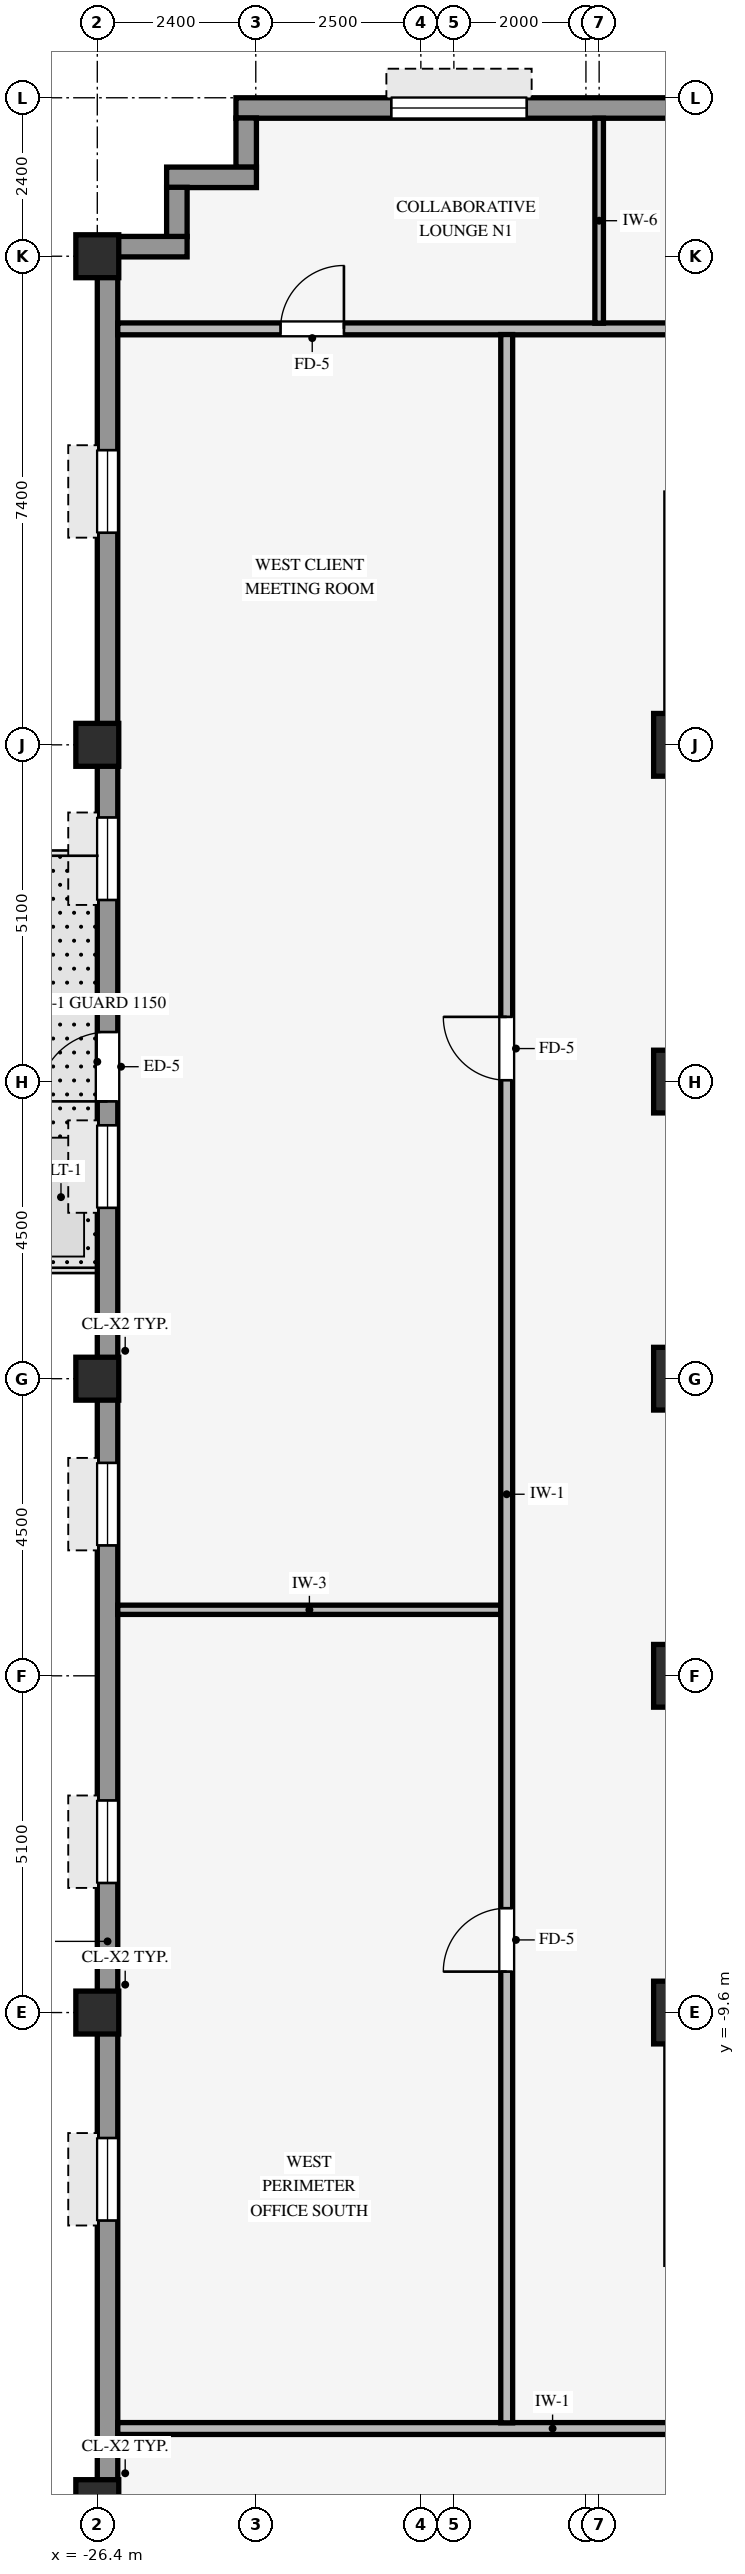
"""IFC4 building model, lengths in metres.
Left out: names, types, materials, properties, quantities, classifications, styles, units other than length and angle.
Written with IfcOpenShell. Run it as: python <this file> out.ifc"""

import sys

from ifc_helpers import new_model, si_unit, direction, frame, frame_2d, origin, origin_2d, place, context, subcontext, project, spatial, rectangle, hollow_rectangle, extrude, source, transform, mapped, element, fill, save


model = new_model("IFC4")
c1 = context("Model", 3, precision=1e-05, world=origin(), true_north=direction((0.0, 1.0)))
c2 = subcontext(c1, "Body", "Model", "MODEL_VIEW")
j1 = project(units=[si_unit("LENGTHUNIT", "METRE"), si_unit("PLANEANGLEUNIT", "RADIAN")], contexts=[c1])
p1 = place(None, origin())
s1 = spatial("IfcSite", under=j1, at=p1, CompositionType="ELEMENT")
p2 = place(p1, origin())
s2 = spatial("IfcBuilding", under=s1, at=p2, CompositionType="ELEMENT")
p3 = place(p2, frame((0.0, 0.0, 171.3)))
s3 = spatial("IfcBuildingStorey", under=s2, at=p3, CompositionType="ELEMENT", Elevation=171.3)
for number, where, z_axis, x_axis in (
    (1, (-17.5, -9.6, 0.0), (0.0, 0.0, 1.0), (1.0, 0.0, 0.0)),
    (2, (-17.5, -4.5, 0.0), (0.0, 0.0, 1.0), (1.0, 0.0, 0.0)),
    (3, (-17.5, 4.5, 0.0), (0.0, 0.0, 1.0), (1.0, 0.0, 0.0)),
    (4, (-17.5, 9.6, 0.0), (0.0, 0.0, 1.0), (1.0, 0.0, 0.0)),
    (5, (-17.5, 0.0, 0.0), (0.0, 0.0, 1.0), (1.0, 0.0, 0.0)),
):
    element("IfcColumn", number, at=place(p3, frame(where, z_axis=z_axis, x_axis=x_axis)), inside=s3, PredefinedType="COLUMN", context=c2, shape_type="SweptSolid", body=[
        extrude(rectangle(XDim=0.95, YDim=0.95, at=origin_2d()), origin(), (0.0, 0.0, 1.0), 3.37),
    ])
for number, where, z_axis, x_axis in (
    (6, (-26.4, -17.0, 0.0), (0.0, 0.0, 1.0), (1.0, 0.0, 0.0)),
    (7, (-26.4, -9.6, 0.0), (0.0, 0.0, 1.0), (1.0, 0.0, 0.0)),
    (8, (-26.4, 0.0, 0.0), (0.0, 0.0, 1.0), (1.0, 0.0, 0.0)),
    (9, (-26.4, 9.6, 0.0), (0.0, 0.0, 1.0), (1.0, 0.0, 0.0)),
    (10, (-26.4, 17.0, 0.0), (0.0, 0.0, 1.0), (1.0, 0.0, 0.0)),
):
    element("IfcColumn", number, at=place(p3, frame(where, z_axis=z_axis, x_axis=x_axis)), inside=s3, PredefinedType="COLUMN", context=c2, shape_type="SweptSolid", body=[
        extrude(hollow_rectangle(XDim=0.65, YDim=0.65, WallThickness=0.04, InnerFilletRadius=0.04, OuterFilletRadius=0.08, at=origin_2d()), origin(), (0.0, 0.0, 1.0), 3.37),
    ])
p4 = place(p3, frame((-24.3, 19.245, 0.0), z_axis=(0.0, 0.0, 1.0), x_axis=(1.0, 0.0, 0.0)))
e11 = element("IfcWall", 11, at=p4, inside=s3, PredefinedType="STANDARD", context=c2, shape_type="SweptSolid", body=[
    extrude(rectangle(XDim=44.8, YDim=0.31, at=frame_2d((22.4, 0.0))), origin(), (0.0, 0.0, 1.0), 2.705),
])
p5 = place(p4, frame((2.353, 0.0, 0.8)))
e12 = element("IfcOpeningElement", 12, at=p5, cuts=e11, PredefinedType="OPENING", context=c2, shape_type="SweptSolid", body=[
    extrude(rectangle(XDim=2.05, YDim=1.52, at=frame_2d((1.025, 0.76))), frame((0.0, 0.165, 0.0), z_axis=(0.0, -1.0, 0.0), x_axis=(1.0, 0.0, 0.0)), (0.0, 0.0, 1.0), 0.33),
])
p6 = place(p4, frame((7.108, 0.0, 0.8)))
e13 = element("IfcOpeningElement", 13, at=p6, cuts=e11, PredefinedType="OPENING", context=c2, shape_type="SweptSolid", body=[
    extrude(rectangle(XDim=2.05, YDim=1.52, at=frame_2d((1.025, 0.76))), frame((0.0, 0.165, 0.0), z_axis=(0.0, -1.0, 0.0), x_axis=(1.0, 0.0, 0.0)), (0.0, 0.0, 1.0), 0.33),
])
p7 = place(p4, frame((11.414, 0.0, 0.8)))
e14 = element("IfcOpeningElement", 14, at=p7, cuts=e11, PredefinedType="OPENING", context=c2, shape_type="SweptSolid", body=[
    extrude(rectangle(XDim=2.05, YDim=1.52, at=frame_2d((1.025, 0.76))), frame((0.0, 0.165, 0.0), z_axis=(0.0, -1.0, 0.0), x_axis=(1.0, 0.0, 0.0)), (0.0, 0.0, 1.0), 0.33),
])
p8 = place(p4, frame((16.619, 0.0, 0.8)))
e15 = element("IfcOpeningElement", 15, at=p8, cuts=e11, PredefinedType="OPENING", context=c2, shape_type="SweptSolid", body=[
    extrude(rectangle(XDim=2.05, YDim=1.52, at=frame_2d((1.025, 0.76))), frame((0.0, 0.165, 0.0), z_axis=(0.0, -1.0, 0.0), x_axis=(1.0, 0.0, 0.0)), (0.0, 0.0, 1.0), 0.33),
])
p9 = place(p4, frame((20.925, 0.0, 0.8)))
e16 = element("IfcOpeningElement", 16, at=p9, cuts=e11, PredefinedType="OPENING", context=c2, shape_type="SweptSolid", body=[
    extrude(rectangle(XDim=2.05, YDim=1.52, at=frame_2d((1.025, 0.76))), frame((0.0, 0.165, 0.0), z_axis=(0.0, -1.0, 0.0), x_axis=(1.0, 0.0, 0.0)), (0.0, 0.0, 1.0), 0.33),
])
p10 = place(p4, frame((26.131, 0.0, 0.8)))
e17 = element("IfcOpeningElement", 17, at=p10, cuts=e11, PredefinedType="OPENING", context=c2, shape_type="SweptSolid", body=[
    extrude(rectangle(XDim=2.05, YDim=1.52, at=frame_2d((1.025, 0.76))), frame((0.0, 0.165, 0.0), z_axis=(0.0, -1.0, 0.0), x_axis=(1.0, 0.0, 0.0)), (0.0, 0.0, 1.0), 0.33),
])
p11 = place(p4, frame((29.986, 0.0, 0.8)))
e18 = element("IfcOpeningElement", 18, at=p11, cuts=e11, PredefinedType="OPENING", context=c2, shape_type="SweptSolid", body=[
    extrude(rectangle(XDim=2.05, YDim=1.52, at=frame_2d((1.025, 0.76))), frame((0.0, 0.165, 0.0), z_axis=(0.0, -1.0, 0.0), x_axis=(1.0, 0.0, 0.0)), (0.0, 0.0, 1.0), 0.33),
])
p12 = place(p4, frame((35.642, 0.0, 0.8)))
e19 = element("IfcOpeningElement", 19, at=p12, cuts=e11, PredefinedType="OPENING", context=c2, shape_type="SweptSolid", body=[
    extrude(rectangle(XDim=2.05, YDim=1.52, at=frame_2d((1.025, 0.76))), frame((0.0, 0.165, 0.0), z_axis=(0.0, -1.0, 0.0), x_axis=(1.0, 0.0, 0.0)), (0.0, 0.0, 1.0), 0.33),
])
p13 = place(p4, frame((40.397, 0.0, 0.8)))
e20 = element("IfcOpeningElement", 20, at=p13, cuts=e11, PredefinedType="OPENING", context=c2, shape_type="SweptSolid", body=[
    extrude(rectangle(XDim=2.05, YDim=1.52, at=frame_2d((1.025, 0.76))), frame((0.0, 0.165, 0.0), z_axis=(0.0, -1.0, 0.0), x_axis=(1.0, 0.0, 0.0)), (0.0, 0.0, 1.0), 0.33),
])
p14 = place(p3, frame((-24.145, 18.346, 0.0), z_axis=(0.0, 0.0, 1.0), x_axis=(0.0, 1.0, 0.0)))
e21 = element("IfcWall", 21, at=p14, inside=s3, PredefinedType="STANDARD", context=c2, shape_type="SweptSolid", body=[
    extrude(rectangle(XDim=0.748, YDim=0.31, at=frame_2d((0.374, 0.0))), origin(), (0.0, 0.0, 1.0), 2.816),
])
p15 = place(p3, frame((-25.35, 18.195, 0.0), z_axis=(0.0, 0.0, 1.0), x_axis=(1.0, 0.0, 0.0)))
e22 = element("IfcWall", 22, at=p15, inside=s3, PredefinedType="STANDARD", context=c2, shape_type="SweptSolid", body=[
    extrude(rectangle(XDim=1.36, YDim=0.31, at=frame_2d((0.68, 0.0))), origin(), (0.0, 0.0, 1.0), 2.816),
])
p16 = place(p3, frame((-25.195, 17.296, 0.0), z_axis=(0.0, 0.0, 1.0), x_axis=(0.0, 1.0, 0.0)))
e23 = element("IfcWall", 23, at=p16, inside=s3, PredefinedType="STANDARD", context=c2, shape_type="SweptSolid", body=[
    extrude(rectangle(XDim=0.748, YDim=0.31, at=frame_2d((0.374, 0.0))), origin(), (0.0, 0.0, 1.0), 2.816),
])
p17 = place(p3, frame((-26.4, 17.145, 0.0), z_axis=(0.0, 0.0, 1.0), x_axis=(1.0, 0.0, 0.0)))
e24 = element("IfcWall", 24, at=p17, inside=s3, PredefinedType="STANDARD", context=c2, shape_type="SweptSolid", body=[
    extrude(rectangle(XDim=1.36, YDim=0.31, at=frame_2d((0.68, 0.0))), origin(), (0.0, 0.0, 1.0), 2.816),
])
p18 = place(p3, frame((-26.245, -20.794, 0.0), z_axis=(0.0, 0.0, 1.0), x_axis=(0.0, 1.0, 0.0)))
e25 = element("IfcWall", 25, at=p18, inside=s3, PredefinedType="STANDARD", context=c2, shape_type="SweptSolid", body=[
    extrude(rectangle(XDim=37.788, YDim=0.31, at=frame_2d((18.894, 0.0))), origin(), (0.0, 0.0, 1.0), 2.705),
])
p19 = place(p18, frame((24.994, 0.0, 0.0)))
e26 = element("IfcOpeningElement", 26, at=p19, cuts=e25, PredefinedType="OPENING", context=c2, shape_type="SweptSolid", body=[
    extrude(rectangle(XDim=1.05, YDim=2.1, at=frame_2d((0.525, 1.05))), frame((0.0, 0.165, 0.0), z_axis=(0.0, -1.0, 0.0), x_axis=(1.0, 0.0, 0.0)), (0.0, 0.0, 1.0), 0.33),
])
p20 = place(p18, frame((1.581, 0.0, 0.8)))
e27 = element("IfcOpeningElement", 27, at=p20, cuts=e25, PredefinedType="OPENING", context=c2, shape_type="SweptSolid", body=[
    extrude(rectangle(XDim=1.25, YDim=1.52, at=frame_2d((0.625, 0.76))), frame((0.0, 0.165, 0.0), z_axis=(0.0, -1.0, 0.0), x_axis=(1.0, 0.0, 0.0)), (0.0, 0.0, 1.0), 0.33),
])
p21 = place(p18, frame((8.044, 0.0, 0.8)))
e28 = element("IfcOpeningElement", 28, at=p21, cuts=e25, PredefinedType="OPENING", context=c2, shape_type="SweptSolid", body=[
    extrude(rectangle(XDim=1.25, YDim=1.52, at=frame_2d((0.625, 0.76))), frame((0.0, 0.165, 0.0), z_axis=(0.0, -1.0, 0.0), x_axis=(1.0, 0.0, 0.0)), (0.0, 0.0, 1.0), 0.33),
])
p22 = place(p18, frame((13.156, 0.0, 0.8)))
e29 = element("IfcOpeningElement", 29, at=p22, cuts=e25, PredefinedType="OPENING", context=c2, shape_type="SweptSolid", body=[
    extrude(rectangle(XDim=1.25, YDim=1.52, at=frame_2d((0.625, 0.76))), frame((0.0, 0.165, 0.0), z_axis=(0.0, -1.0, 0.0), x_axis=(1.0, 0.0, 0.0)), (0.0, 0.0, 1.0), 0.33),
])
p23 = place(p18, frame((18.269, 0.0, 0.8)))
e30 = element("IfcOpeningElement", 30, at=p23, cuts=e25, PredefinedType="OPENING", context=c2, shape_type="SweptSolid", body=[
    extrude(rectangle(XDim=1.25, YDim=1.52, at=frame_2d((0.625, 0.76))), frame((0.0, 0.165, 0.0), z_axis=(0.0, -1.0, 0.0), x_axis=(1.0, 0.0, 0.0)), (0.0, 0.0, 1.0), 0.33),
])
p24 = place(p18, frame((23.382, 0.0, 0.8)))
e31 = element("IfcOpeningElement", 31, at=p24, cuts=e25, PredefinedType="OPENING", context=c2, shape_type="SweptSolid", body=[
    extrude(rectangle(XDim=1.25, YDim=1.52, at=frame_2d((0.625, 0.76))), frame((0.0, 0.165, 0.0), z_axis=(0.0, -1.0, 0.0), x_axis=(1.0, 0.0, 0.0)), (0.0, 0.0, 1.0), 0.33),
])
p25 = place(p18, frame((28.044, 0.0, 0.8)))
e32 = element("IfcOpeningElement", 32, at=p25, cuts=e25, PredefinedType="OPENING", context=c2, shape_type="SweptSolid", body=[
    extrude(rectangle(XDim=1.25, YDim=1.52, at=frame_2d((0.625, 0.76))), frame((0.0, 0.165, 0.0), z_axis=(0.0, -1.0, 0.0), x_axis=(1.0, 0.0, 0.0)), (0.0, 0.0, 1.0), 0.33),
])
p26 = place(p18, frame((33.607, 0.0, 0.8)))
e33 = element("IfcOpeningElement", 33, at=p26, cuts=e25, PredefinedType="OPENING", context=c2, shape_type="SweptSolid", body=[
    extrude(rectangle(XDim=1.25, YDim=1.52, at=frame_2d((0.625, 0.76))), frame((0.0, 0.165, 0.0), z_axis=(0.0, -1.0, 0.0), x_axis=(1.0, 0.0, 0.0)), (0.0, 0.0, 1.0), 0.33),
])
p27 = place(p3, frame((-26.09, -15.9, 0.0), z_axis=(0.0, 0.0, 1.0), x_axis=(1.0, 0.0, 0.0)))
e34 = element("IfcWall", 34, at=p27, inside=s3, PredefinedType="PARTITIONING", context=c2, shape_type="SweptSolid", body=[
    extrude(rectangle(XDim=48.38, YDim=0.18, at=frame_2d((24.19, 0.0))), origin(), (0.0, 0.0, 1.0), 3.36),
])
p28 = place(p27, frame((26.51, 0.0, 0.0)))
e35 = element("IfcOpeningElement", 35, at=p28, cuts=e34, PredefinedType="OPENING", context=c2, shape_type="SweptSolid", body=[
    extrude(rectangle(XDim=0.96, YDim=2.1, at=frame_2d((0.48, 1.05))), frame((0.0, 0.1, 0.0), z_axis=(0.0, -1.0, 0.0), x_axis=(1.0, 0.0, 0.0)), (0.0, 0.0, 1.0), 0.2),
])
p29 = place(p27, frame((40.51, 0.0, 0.0)))
e36 = element("IfcOpeningElement", 36, at=p29, cuts=e34, PredefinedType="OPENING", context=c2, shape_type="SweptSolid", body=[
    extrude(rectangle(XDim=0.96, YDim=2.1, at=frame_2d((0.48, 1.05))), frame((0.0, 0.1, 0.0), z_axis=(0.0, -1.0, 0.0), x_axis=(1.0, 0.0, 0.0)), (0.0, 0.0, 1.0), 0.2),
])
p30 = place(p27, frame((13.62, 0.0, 0.0)))
e37 = element("IfcOpeningElement", 37, at=p30, cuts=e34, PredefinedType="OPENING", context=c2, shape_type="SweptSolid", body=[
    extrude(rectangle(XDim=0.96, YDim=2.1, at=frame_2d((0.48, 1.05))), frame((0.0, 0.1, 0.0), z_axis=(0.0, -1.0, 0.0), x_axis=(1.0, 0.0, 0.0)), (0.0, 0.0, 1.0), 0.2),
])
p31 = place(p3, frame((-26.09, -3.5, 0.0), z_axis=(0.0, 0.0, 1.0), x_axis=(1.0, 0.0, 0.0)))
e38 = element("IfcWall", 38, at=p31, inside=s3, PredefinedType="PARTITIONING", context=c2, shape_type="SweptSolid", body=[
    extrude(rectangle(XDim=5.804, YDim=0.14, at=frame_2d((2.902, 0.0))), origin(), (0.0, 0.0, 1.0), 3.36),
])
p32 = place(p3, frame((-26.09, 15.9, 0.0), z_axis=(0.0, 0.0, 1.0), x_axis=(1.0, 0.0, 0.0)))
e39 = element("IfcWall", 39, at=p32, inside=s3, PredefinedType="PARTITIONING", context=c2, shape_type="SweptSolid", body=[
    extrude(rectangle(XDim=48.38, YDim=0.18, at=frame_2d((24.19, 0.0))), origin(), (0.0, 0.0, 1.0), 3.36),
])
p33 = place(p32, frame((40.51, 0.0, 0.0)))
e40 = element("IfcOpeningElement", 40, at=p33, cuts=e39, PredefinedType="OPENING", context=c2, shape_type="SweptSolid", body=[
    extrude(rectangle(XDim=0.96, YDim=2.1, at=frame_2d((0.48, 1.05))), frame((0.0, 0.1, 0.0), z_axis=(0.0, -1.0, 0.0), x_axis=(1.0, 0.0, 0.0)), (0.0, 0.0, 1.0), 0.2),
])
p34 = place(p32, frame((19.995, 0.0, 0.0)))
e41 = element("IfcOpeningElement", 41, at=p34, cuts=e39, PredefinedType="OPENING", context=c2, shape_type="SweptSolid", body=[
    extrude(rectangle(XDim=0.96, YDim=2.1, at=frame_2d((0.48, 1.05))), frame((0.0, 0.1, 0.0), z_axis=(0.0, -1.0, 0.0), x_axis=(1.0, 0.0, 0.0)), (0.0, 0.0, 1.0), 0.2),
])
p35 = place(p32, frame((28.45, 0.0, 0.0)))
e42 = element("IfcOpeningElement", 42, at=p35, cuts=e39, PredefinedType="OPENING", context=c2, shape_type="SweptSolid", body=[
    extrude(rectangle(XDim=0.96, YDim=2.1, at=frame_2d((0.48, 1.05))), frame((0.0, 0.1, 0.0), z_axis=(0.0, -1.0, 0.0), x_axis=(1.0, 0.0, 0.0)), (0.0, 0.0, 1.0), 0.2),
])
p36 = place(p32, frame((11.605, 0.0, 0.0)))
e43 = element("IfcOpeningElement", 43, at=p36, cuts=e39, PredefinedType="OPENING", context=c2, shape_type="SweptSolid", body=[
    extrude(rectangle(XDim=0.96, YDim=2.1, at=frame_2d((0.48, 1.05))), frame((0.0, 0.1, 0.0), z_axis=(0.0, -1.0, 0.0), x_axis=(1.0, 0.0, 0.0)), (0.0, 0.0, 1.0), 0.2),
])
p37 = place(p32, frame((2.465, 0.0, 0.0)))
e44 = element("IfcOpeningElement", 44, at=p37, cuts=e39, PredefinedType="OPENING", context=c2, shape_type="SweptSolid", body=[
    extrude(rectangle(XDim=0.96, YDim=2.1, at=frame_2d((0.48, 1.05))), frame((0.0, 0.1, 0.0), z_axis=(0.0, -1.0, 0.0), x_axis=(1.0, 0.0, 0.0)), (0.0, 0.0, 1.0), 0.2),
])
p38 = place(p3, frame((-20.2, -15.814, 0.0), z_axis=(0.0, 0.0, 1.0), x_axis=(0.0, 1.0, 0.0)))
e45 = element("IfcWall", 45, at=p38, inside=s3, PredefinedType="PARTITIONING", context=c2, shape_type="SweptSolid", body=[
    extrude(rectangle(XDim=31.628, YDim=0.18, at=frame_2d((15.814, 0.0))), origin(), (0.0, 0.0, 1.0), 3.36),
])
p39 = place(p38, frame((20.334, 0.0, 0.0)))
e46 = element("IfcOpeningElement", 46, at=p39, cuts=e45, PredefinedType="OPENING", context=c2, shape_type="SweptSolid", body=[
    extrude(rectangle(XDim=0.96, YDim=2.1, at=frame_2d((0.48, 1.05))), frame((0.0, 0.1, 0.0), z_axis=(0.0, -1.0, 0.0), x_axis=(1.0, 0.0, 0.0)), (0.0, 0.0, 1.0), 0.2),
])
p40 = place(p38, frame((6.834, 0.0, 0.0)))
e47 = element("IfcOpeningElement", 47, at=p40, cuts=e45, PredefinedType="OPENING", context=c2, shape_type="SweptSolid", body=[
    extrude(rectangle(XDim=0.96, YDim=2.1, at=frame_2d((0.48, 1.05))), frame((0.0, 0.1, 0.0), z_axis=(0.0, -1.0, 0.0), x_axis=(1.0, 0.0, 0.0)), (0.0, 0.0, 1.0), 0.2),
])
p41 = place(p3, frame((-18.8, 15.986, 0.0), z_axis=(0.0, 0.0, 1.0), x_axis=(0.0, 1.0, 0.0)))
e48 = element("IfcWall", 48, at=p41, inside=s3, PredefinedType="PARTITIONING", context=c2, shape_type="SweptSolid", body=[
    extrude(rectangle(XDim=3.104, YDim=0.13, at=frame_2d((1.552, 0.0))), origin(), (0.0, 0.0, 1.0), 3.36),
])
m1 = source(origin(), c2, "Body", "SweptSolid", [
    extrude(rectangle(XDim=2.05, YDim=1.52, at=frame_2d((1.025, 0.76))), frame((0.0, 0.03, 0.0), z_axis=(0.0, -1.0, 0.0), x_axis=(1.0, 0.0, 0.0)), (0.0, 0.0, 1.0), 0.06),
])
p42 = place(p5, origin())
e49 = element("IfcWindow", 49, at=p42, inside=s3, PartitioningType="SINGLE_PANEL", PredefinedType="WINDOW", context=c2, shape_type="MappedRepresentation", body=[
    mapped(m1, transform((0.0, 0.0, 0.0), scale=1.0)),
])
fill(e12, e49)
m2 = source(origin(), c2, "Body", "SweptSolid", [
    extrude(rectangle(XDim=1.05, YDim=2.1, at=frame_2d((0.525, 1.05))), frame((0.0, 0.025, 0.0), z_axis=(0.0, -1.0, 0.0), x_axis=(1.0, 0.0, 0.0)), (0.0, 0.0, 1.0), 0.05),
])
p43 = place(p19, origin())
e50 = element("IfcDoor", 50, at=p43, inside=s3, OperationType="SINGLE_SWING_LEFT", PredefinedType="DOOR", context=c2, shape_type="MappedRepresentation", body=[
    mapped(m2, transform((0.0, 0.0, 0.0), scale=1.0)),
])
fill(e26, e50)
m3 = source(origin(), c2, "Body", "SweptSolid", [
    extrude(rectangle(XDim=1.25, YDim=1.52, at=frame_2d((0.625, 0.76))), frame((0.0, 0.03, 0.0), z_axis=(0.0, -1.0, 0.0), x_axis=(1.0, 0.0, 0.0)), (0.0, 0.0, 1.0), 0.06),
])
p44 = place(p21, origin())
e51 = element("IfcWindow", 51, at=p44, inside=s3, PartitioningType="SINGLE_PANEL", PredefinedType="WINDOW", context=c2, shape_type="MappedRepresentation", body=[
    mapped(m3, transform((0.0, 0.0, 0.0), scale=1.0)),
])
fill(e28, e51)
p45 = place(p22, origin())
e52 = element("IfcWindow", 52, at=p45, inside=s3, PartitioningType="SINGLE_PANEL", PredefinedType="WINDOW", context=c2, shape_type="MappedRepresentation", body=[
    mapped(m3, transform((0.0, 0.0, 0.0), scale=1.0)),
])
fill(e29, e52)
p46 = place(p23, origin())
e53 = element("IfcWindow", 53, at=p46, inside=s3, PartitioningType="SINGLE_PANEL", PredefinedType="WINDOW", context=c2, shape_type="MappedRepresentation", body=[
    mapped(m3, transform((0.0, 0.0, 0.0), scale=1.0)),
])
fill(e30, e53)
p47 = place(p24, origin())
e54 = element("IfcWindow", 54, at=p47, inside=s3, PartitioningType="SINGLE_PANEL", PredefinedType="WINDOW", context=c2, shape_type="MappedRepresentation", body=[
    mapped(m3, transform((0.0, 0.0, 0.0), scale=1.0)),
])
fill(e31, e54)
p48 = place(p25, origin())
e55 = element("IfcWindow", 55, at=p48, inside=s3, PartitioningType="SINGLE_PANEL", PredefinedType="WINDOW", context=c2, shape_type="MappedRepresentation", body=[
    mapped(m3, transform((0.0, 0.0, 0.0), scale=1.0)),
])
fill(e32, e55)
p49 = place(p26, origin())
e56 = element("IfcWindow", 56, at=p49, inside=s3, PartitioningType="SINGLE_PANEL", PredefinedType="WINDOW", context=c2, shape_type="MappedRepresentation", body=[
    mapped(m3, transform((0.0, 0.0, 0.0), scale=1.0)),
])
fill(e33, e56)
m4 = source(origin(), c2, "Body", "SweptSolid", [
    extrude(rectangle(XDim=0.96, YDim=2.1, at=frame_2d((0.48, 1.05))), frame((0.0, 0.025, 0.0), z_axis=(0.0, -1.0, 0.0), x_axis=(1.0, 0.0, 0.0)), (0.0, 0.0, 1.0), 0.05),
])
p50 = place(p39, origin())
e57 = element("IfcDoor", 57, at=p50, inside=s3, OperationType="SINGLE_SWING_RIGHT", PredefinedType="DOOR", context=c2, shape_type="MappedRepresentation", body=[
    mapped(m4, transform((0.0, 0.0, 0.0), scale=1.0)),
])
fill(e46, e57)
p51 = place(p40, origin())
e58 = element("IfcDoor", 58, at=p51, inside=s3, OperationType="SINGLE_SWING_LEFT", PredefinedType="DOOR", context=c2, shape_type="MappedRepresentation", body=[
    mapped(m4, transform((0.0, 0.0, 0.0), scale=1.0)),
])
fill(e47, e58)
p52 = place(p37, origin())
e59 = element("IfcDoor", 59, at=p52, inside=s3, OperationType="SINGLE_SWING_RIGHT", PredefinedType="DOOR", context=c2, shape_type="MappedRepresentation", body=[
    mapped(m4, transform((0.0, 0.0, 0.0), scale=1.0)),
])
fill(e44, e59)
save(model, sys.argv[1])
